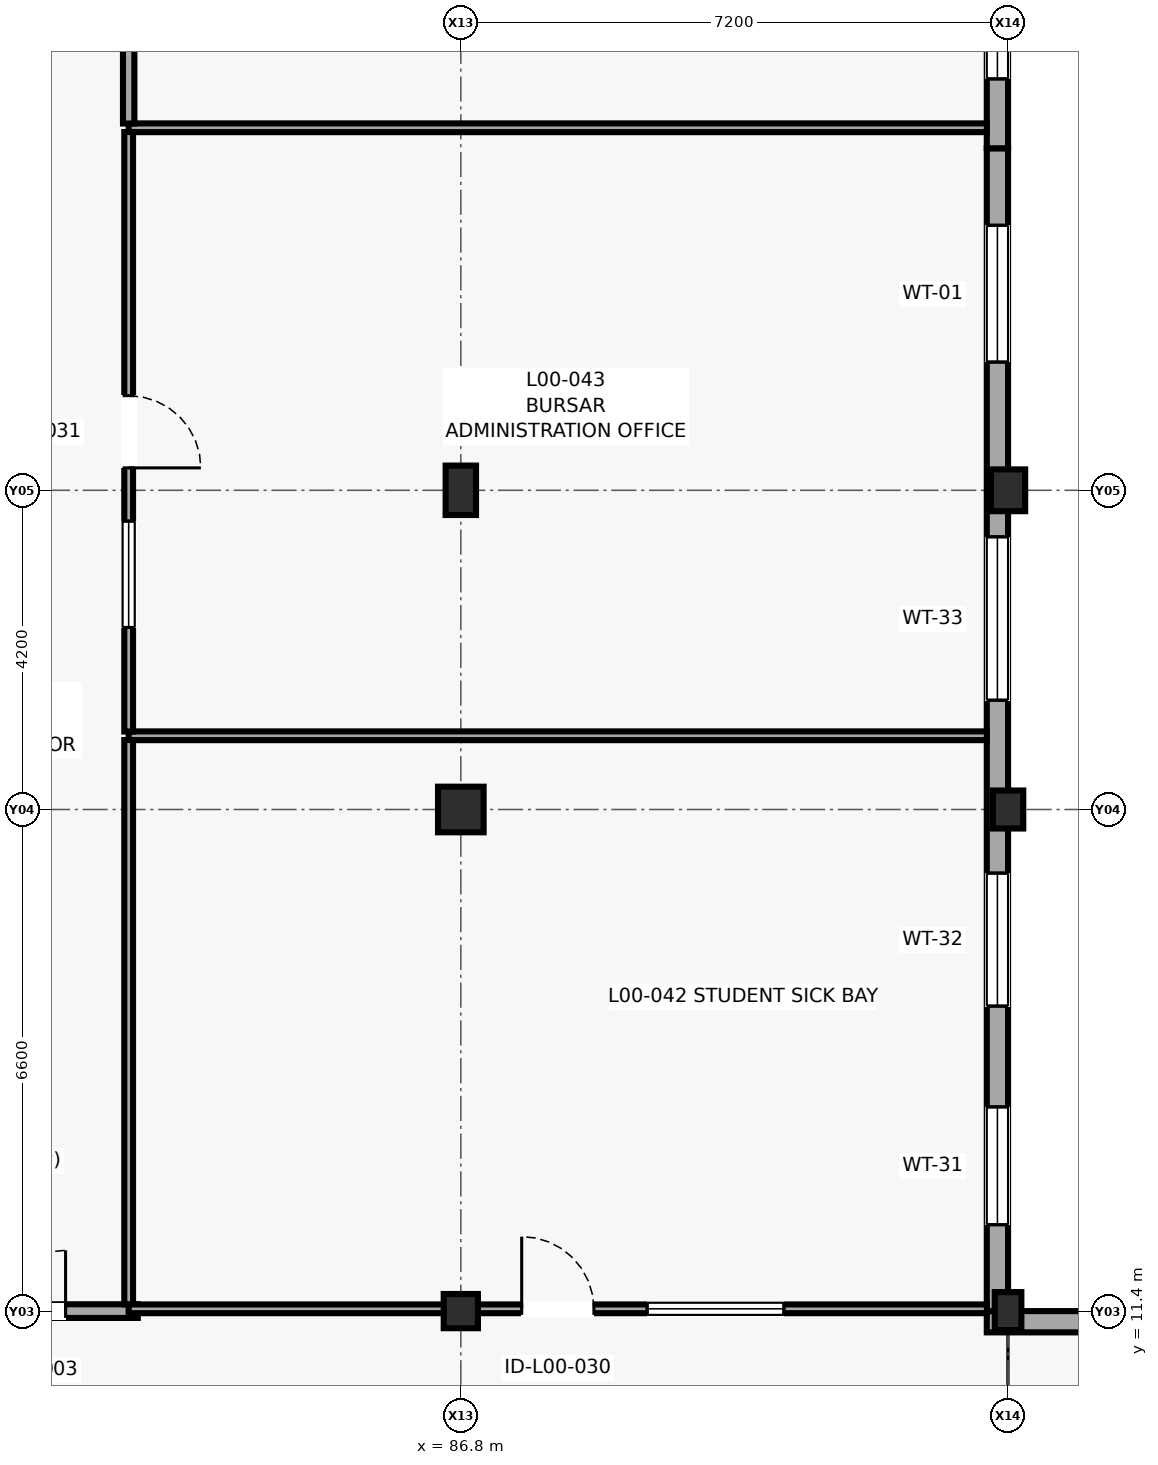
"""IFC4 building model, lengths in metres.
Left out: names, types, materials, properties, quantities, classifications, styles, units other than length and angle.
Written with IfcOpenShell. Run it as: python <this file> out.ifc"""

import sys

from ifc_helpers import new_model, si_unit, direction, frame, frame_2d, origin, origin_2d, place, context, subcontext, project, spatial, rectangle, extrude, element, fill, save


model = new_model("IFC4")
c1 = context("Model", 3, precision=1e-05, world=origin(), true_north=direction((0.0, 1.0)))
c2 = subcontext(c1, "Body", "Model", "MODEL_VIEW")
j1 = project(units=[si_unit("LENGTHUNIT", "METRE"), si_unit("PLANEANGLEUNIT", "RADIAN")], contexts=[c1])
p1 = place(None, origin())
s1 = spatial("IfcSite", under=j1, at=p1, CompositionType="ELEMENT")
p2 = place(p1, origin())
s2 = spatial("IfcBuilding", under=s1, at=p2, CompositionType="ELEMENT")
p3 = place(p2, origin())
s3 = spatial("IfcBuildingStorey", under=s2, at=p3, CompositionType="ELEMENT", Elevation=0.0)
p4 = place(p3, frame((86.8, 11.4, 0.0), z_axis=(0.0, 0.0, 1.0), x_axis=(1.0, 0.0, 0.0)))
e1 = element("IfcColumn", 1, at=p4, inside=s3, PredefinedType="COLUMN", context=c2, shape_type="SweptSolid", body=[
    extrude(rectangle(XDim=0.45, YDim=0.45, at=origin_2d()), origin(), (0.0, 0.0, 1.0), 4.2),
])
p5 = place(p3, frame((86.8, 18.0, 0.0), z_axis=(0.0, 0.0, 1.0), x_axis=(1.0, 0.0, 0.0)))
e2 = element("IfcColumn", 2, at=p5, inside=s3, PredefinedType="COLUMN", context=c2, shape_type="SweptSolid", body=[
    extrude(rectangle(XDim=0.6, YDim=0.6, at=origin_2d()), origin(), (0.0, 0.0, 1.0), 4.2),
])
p6 = place(p3, frame((86.8, 22.2, 0.0), z_axis=(0.0, 0.0, 1.0), x_axis=(1.0, 0.0, 0.0)))
e3 = element("IfcColumn", 3, at=p6, inside=s3, PredefinedType="COLUMN", context=c2, shape_type="SweptSolid", body=[
    extrude(rectangle(XDim=0.4, YDim=0.65, at=origin_2d()), origin(), (0.0, 0.0, 1.0), 4.2),
])
p7 = place(p3, frame((94.0, 11.4, 0.0), z_axis=(0.0, 0.0, 1.0), x_axis=(1.0, 0.0, 0.0)))
e4 = element("IfcColumn", 4, at=p7, inside=s3, PredefinedType="PILASTER", context=c2, shape_type="SweptSolid", body=[
    extrude(rectangle(XDim=0.35, YDim=0.5, at=origin_2d()), origin(), (0.0, 0.0, 1.0), 4.2),
])
p8 = place(p3, frame((94.0, 18.0, 0.0), z_axis=(0.0, 0.0, 1.0), x_axis=(1.0, 0.0, 0.0)))
e5 = element("IfcColumn", 5, at=p8, inside=s3, PredefinedType="PILASTER", context=c2, shape_type="SweptSolid", body=[
    extrude(rectangle(XDim=0.4, YDim=0.5, at=origin_2d()), origin(), (0.0, 0.0, 1.0), 4.2),
])
p9 = place(p3, frame((94.0, 22.2, 0.0), z_axis=(0.0, 0.0, 1.0), x_axis=(1.0, 0.0, 0.0)))
e6 = element("IfcColumn", 6, at=p9, inside=s3, PredefinedType="PILASTER", context=c2, shape_type="SweptSolid", body=[
    extrude(rectangle(XDim=0.45, YDim=0.55, at=origin_2d()), origin(), (0.0, 0.0, 1.0), 4.2),
])
p10 = place(p3, frame((106.444, 11.26, 0.0), z_axis=(0.0, 0.0, 1.0), x_axis=(-1.0, 0.0, 0.0)))
e7 = element("IfcWall", 7, at=p10, inside=s3, PredefinedType="SOLIDWALL", context=c2, shape_type="SweptSolid", body=[
    extrude(rectangle(XDim=12.724, YDim=0.28, at=frame_2d((6.362, 0.0))), origin(), (0.0, 0.0, 1.0), 3.205),
])
p11 = place(p10, frame((1.121, 0.0, 0.75)))
e8 = element("IfcOpeningElement", 8, at=p11, cuts=e7, PredefinedType="OPENING", context=c2, shape_type="SweptSolid", body=[
    extrude(rectangle(XDim=2.0, YDim=2.1, at=frame_2d((1.0, 1.05))), frame((0.0, 0.15, 0.0), z_axis=(0.0, -1.0, 0.0), x_axis=(1.0, 0.0, 0.0)), (0.0, 0.0, 1.0), 0.3),
])
p12 = place(p10, frame((5.987, 0.0, 0.85)))
e9 = element("IfcOpeningElement", 9, at=p12, cuts=e7, PredefinedType="OPENING", context=c2, shape_type="SweptSolid", body=[
    extrude(rectangle(XDim=1.65, YDim=1.95, at=frame_2d((0.825, 0.975))), frame((0.0, 0.15, 0.0), z_axis=(0.0, -1.0, 0.0), x_axis=(1.0, 0.0, 0.0)), (0.0, 0.0, 1.0), 0.3),
])
p13 = place(p10, frame((10.053, 0.0, 0.75)))
e10 = element("IfcOpeningElement", 10, at=p13, cuts=e7, PredefinedType="OPENING", context=c2, shape_type="SweptSolid", body=[
    extrude(rectangle(XDim=1.1, YDim=2.1, at=frame_2d((0.55, 1.05))), frame((0.0, 0.15, 0.0), z_axis=(0.0, -1.0, 0.0), x_axis=(1.0, 0.0, 0.0)), (0.0, 0.0, 1.0), 0.3),
])
p14 = place(p3, frame((93.86, 11.4, 0.0), z_axis=(0.0, 0.0, 1.0), x_axis=(0.0, 1.0, 0.0)))
e11 = element("IfcWall", 11, at=p14, inside=s3, PredefinedType="SOLIDWALL", context=c2, shape_type="SweptSolid", body=[
    extrude(rectangle(XDim=15.3, YDim=0.28, at=frame_2d((7.65, 0.0))), origin(), (0.0, 0.0, 1.0), 3.375),
])
p15 = place(p14, frame((1.137, 0.0, 0.85)))
e12 = element("IfcOpeningElement", 12, at=p15, cuts=e11, PredefinedType="OPENING", context=c2, shape_type="SweptSolid", body=[
    extrude(rectangle(XDim=1.55, YDim=1.85, at=frame_2d((0.775, 0.925))), frame((0.0, 0.15, 0.0), z_axis=(0.0, -1.0, 0.0), x_axis=(1.0, 0.0, 0.0)), (0.0, 0.0, 1.0), 0.3),
])
p16 = place(p14, frame((4.013, 0.0, 0.75)))
e13 = element("IfcOpeningElement", 13, at=p16, cuts=e11, PredefinedType="OPENING", context=c2, shape_type="SweptSolid", body=[
    extrude(rectangle(XDim=1.75, YDim=2.05, at=frame_2d((0.875, 1.025))), frame((0.0, 0.15, 0.0), z_axis=(0.0, -1.0, 0.0), x_axis=(1.0, 0.0, 0.0)), (0.0, 0.0, 1.0), 0.3),
])
p17 = place(p14, frame((8.038, 0.0, 0.85)))
e14 = element("IfcOpeningElement", 14, at=p17, cuts=e11, PredefinedType="OPENING", context=c2, shape_type="SweptSolid", body=[
    extrude(rectangle(XDim=2.15, YDim=1.95, at=frame_2d((1.075, 0.975))), frame((0.0, 0.15, 0.0), z_axis=(0.0, -1.0, 0.0), x_axis=(1.0, 0.0, 0.0)), (0.0, 0.0, 1.0), 0.3),
])
p18 = place(p14, frame((12.487, 0.0, 0.85)))
e15 = element("IfcOpeningElement", 15, at=p18, cuts=e11, PredefinedType="OPENING", context=c2, shape_type="SweptSolid", body=[
    extrude(rectangle(XDim=1.8, YDim=1.8, at=frame_2d((0.9, 0.9))), frame((0.0, 0.15, 0.0), z_axis=(0.0, -1.0, 0.0), x_axis=(1.0, 0.0, 0.0)), (0.0, 0.0, 1.0), 0.3),
])
p19 = place(p3, frame((93.86, 26.7, 0.0), z_axis=(0.0, 0.0, 1.0), x_axis=(0.0, 1.0, 0.0)))
e16 = element("IfcWall", 16, at=p19, inside=s3, PredefinedType="SOLIDWALL", context=c2, shape_type="SweptSolid", body=[
    extrude(rectangle(XDim=15.3, YDim=0.28, at=frame_2d((7.65, 0.0))), origin(), (0.0, 0.0, 1.0), 3.375),
])
p20 = place(p19, frame((0.913, 0.0, 0.75)))
e17 = element("IfcOpeningElement", 17, at=p20, cuts=e16, PredefinedType="OPENING", context=c2, shape_type="SweptSolid", body=[
    extrude(rectangle(XDim=1.1, YDim=2.1, at=frame_2d((0.55, 1.05))), frame((0.0, 0.15, 0.0), z_axis=(0.0, -1.0, 0.0), x_axis=(1.0, 0.0, 0.0)), (0.0, 0.0, 1.0), 0.3),
])
p21 = place(p19, frame((4.338, 0.0, 0.75)))
e18 = element("IfcOpeningElement", 18, at=p21, cuts=e16, PredefinedType="OPENING", context=c2, shape_type="SweptSolid", body=[
    extrude(rectangle(XDim=1.1, YDim=2.1, at=frame_2d((0.55, 1.05))), frame((0.0, 0.15, 0.0), z_axis=(0.0, -1.0, 0.0), x_axis=(1.0, 0.0, 0.0)), (0.0, 0.0, 1.0), 0.3),
])
p22 = place(p19, frame((8.263, 0.0, 1.05)))
e19 = element("IfcOpeningElement", 19, at=p22, cuts=e16, PredefinedType="OPENING", context=c2, shape_type="SweptSolid", body=[
    extrude(rectangle(XDim=0.9, YDim=1.5, at=frame_2d((0.45, 0.75))), frame((0.0, 0.15, 0.0), z_axis=(0.0, -1.0, 0.0), x_axis=(1.0, 0.0, 0.0)), (0.0, 0.0, 1.0), 0.3),
])
p23 = place(p19, frame((12.788, 0.0, 0.85)))
e20 = element("IfcOpeningElement", 20, at=p23, cuts=e16, PredefinedType="OPENING", context=c2, shape_type="SweptSolid", body=[
    extrude(rectangle(XDim=1.2, YDim=1.65, at=frame_2d((0.6, 0.825))), frame((0.0, 0.15, 0.0), z_axis=(0.0, -1.0, 0.0), x_axis=(1.0, 0.0, 0.0)), (0.0, 0.0, 1.0), 0.3),
])
p24 = place(p3, frame((79.05, 11.4, 0.0), z_axis=(0.0, 0.0, 1.0), x_axis=(1.0, 0.0, 0.0)))
e21 = element("IfcWall", 21, at=p24, inside=s3, PredefinedType="PARTITIONING", context=c2, shape_type="SweptSolid", body=[
    extrude(rectangle(XDim=3.5, YDim=0.18, at=frame_2d((1.75, 0.0))), origin(), (0.0, 0.0, 1.0), 3.255),
])
p25 = place(p24, frame((0.95, 0.0, 0.0)))
e22 = element("IfcOpeningElement", 22, at=p25, cuts=e21, PredefinedType="OPENING", context=c2, shape_type="SweptSolid", body=[
    extrude(rectangle(XDim=1.6, YDim=2.25, at=frame_2d((0.8, 1.125))), frame((0.0, 0.1, 0.0), z_axis=(0.0, -1.0, 0.0), x_axis=(1.0, 0.0, 0.0)), (0.0, 0.0, 1.0), 0.2),
])
p26 = place(p3, frame((93.722, 18.97, 0.0), z_axis=(0.0, 0.0, 1.0), x_axis=(-1.0, 0.0, 0.0)))
e23 = element("IfcWall", 23, at=p26, inside=s3, PredefinedType="PARTITIONING", context=c2, shape_type="SweptSolid", body=[
    extrude(rectangle(XDim=11.292, YDim=0.115, at=frame_2d((5.646, 0.0))), origin(), (0.0, 0.0, 1.0), 3.955),
])
p27 = place(p3, frame((82.43, 18.914, 0.0), z_axis=(0.0, 0.0, 1.0), x_axis=(0.0, -1.0, 0.0)))
e24 = element("IfcWall", 24, at=p27, inside=s3, PredefinedType="PARTITIONING", context=c2, shape_type="SweptSolid", body=[
    extrude(rectangle(XDim=7.426, YDim=0.115, at=frame_2d((3.713, 0.0))), origin(), (0.0, 0.0, 1.0), 3.955),
])
p28 = place(p3, frame((82.43, 11.43, 0.0), z_axis=(0.0, 0.0, 1.0), x_axis=(1.0, 0.0, 0.0)))
e25 = element("IfcWall", 25, at=p28, inside=s3, PredefinedType="PARTITIONING", context=c2, shape_type="SweptSolid", body=[
    extrude(rectangle(XDim=11.292, YDim=0.115, at=frame_2d((5.646, 0.0))), origin(), (0.0, 0.0, 1.0), 3.255),
])
p29 = place(p28, frame((5.171, 0.0, 0.0)))
e26 = element("IfcOpeningElement", 26, at=p29, cuts=e25, PredefinedType="OPENING", context=c2, shape_type="SweptSolid", body=[
    extrude(rectangle(XDim=0.95, YDim=2.05, at=frame_2d((0.475, 1.025))), frame((0.0, 0.067, 0.0), z_axis=(0.0, -1.0, 0.0), x_axis=(1.0, 0.0, 0.0)), (0.0, 0.0, 1.0), 0.135),
])
p30 = place(p28, frame((6.821, 0.0, 1.05)))
e27 = element("IfcOpeningElement", 27, at=p30, cuts=e25, PredefinedType="OPENING", context=c2, shape_type="SweptSolid", body=[
    extrude(rectangle(XDim=1.8, YDim=1.2, at=frame_2d((0.9, 0.6))), frame((0.0, 0.067, 0.0), z_axis=(0.0, -1.0, 0.0), x_axis=(1.0, 0.0, 0.0)), (0.0, 0.0, 1.0), 0.135),
])
p31 = place(p3, frame((93.722, 26.97, 0.0), z_axis=(0.0, 0.0, 1.0), x_axis=(-1.0, 0.0, 0.0)))
e28 = element("IfcWall", 28, at=p31, inside=s3, PredefinedType="PARTITIONING", context=c2, shape_type="SweptSolid", body=[
    extrude(rectangle(XDim=11.292, YDim=0.115, at=frame_2d((5.646, 0.0))), origin(), (0.0, 0.0, 1.0), 3.975),
])
p32 = place(p3, frame((82.43, 26.914, 0.0), z_axis=(0.0, 0.0, 1.0), x_axis=(0.0, -1.0, 0.0)))
e29 = element("IfcWall", 29, at=p32, inside=s3, PredefinedType="PARTITIONING", context=c2, shape_type="SweptSolid", body=[
    extrude(rectangle(XDim=7.888, YDim=0.115, at=frame_2d((3.944, 0.0))), origin(), (0.0, 0.0, 1.0), 3.975),
])
p33 = place(p32, frame((3.469, 0.0, 0.0)))
e30 = element("IfcOpeningElement", 30, at=p33, cuts=e29, PredefinedType="OPENING", context=c2, shape_type="SweptSolid", body=[
    extrude(rectangle(XDim=0.95, YDim=2.05, at=frame_2d((0.475, 1.025))), frame((0.0, 0.067, 0.0), z_axis=(0.0, -1.0, 0.0), x_axis=(1.0, 0.0, 0.0)), (0.0, 0.0, 1.0), 0.135),
])
p34 = place(p32, frame((5.119, 0.0, 1.05)))
e31 = element("IfcOpeningElement", 31, at=p34, cuts=e29, PredefinedType="OPENING", context=c2, shape_type="SweptSolid", body=[
    extrude(rectangle(XDim=1.4, YDim=1.05, at=frame_2d((0.7, 0.525))), frame((0.0, 0.067, 0.0), z_axis=(0.0, -1.0, 0.0), x_axis=(1.0, 0.0, 0.0)), (0.0, 0.0, 1.0), 0.135),
])
p35 = place(p3, frame((82.43, 33.437, 0.0), z_axis=(0.0, 0.0, 1.0), x_axis=(0.0, -1.0, 0.0)))
e32 = element("IfcWall", 32, at=p35, inside=s3, PredefinedType="PARTITIONING", context=c2, shape_type="SweptSolid", body=[
    extrude(rectangle(XDim=6.411, YDim=0.15, at=frame_2d((3.206, 0.0))), origin(), (0.0, 0.0, 1.0), 3.975),
])
p36 = place(p35, frame((2.555, 0.0, 0.0)))
e33 = element("IfcOpeningElement", 33, at=p36, cuts=e32, PredefinedType="OPENING", context=c2, shape_type="SweptSolid", body=[
    extrude(rectangle(XDim=1.3, YDim=2.15, at=frame_2d((0.65, 1.075))), frame((0.0, 0.085, 0.0), z_axis=(0.0, -1.0, 0.0), x_axis=(1.0, 0.0, 0.0)), (0.0, 0.0, 1.0), 0.17),
])
p37 = place(p15, origin())
e34 = element("IfcWindow", 34, at=p37, inside=s3, PartitioningType="SINGLE_PANEL", PredefinedType="WINDOW", context=c2, shape_type="SweptSolid", body=[
    extrude(rectangle(XDim=1.55, YDim=1.85, at=frame_2d((0.775, 0.925))), frame((0.0, 0.03, 0.0), z_axis=(0.0, -1.0, 0.0), x_axis=(1.0, 0.0, 0.0)), (0.0, 0.0, 1.0), 0.06),
])
fill(e12, e34)
p38 = place(p16, origin())
e35 = element("IfcWindow", 35, at=p38, inside=s3, PartitioningType="SINGLE_PANEL", PredefinedType="WINDOW", context=c2, shape_type="SweptSolid", body=[
    extrude(rectangle(XDim=1.75, YDim=2.05, at=frame_2d((0.875, 1.025))), frame((0.0, 0.03, 0.0), z_axis=(0.0, -1.0, 0.0), x_axis=(1.0, 0.0, 0.0)), (0.0, 0.0, 1.0), 0.06),
])
fill(e13, e35)
p39 = place(p17, origin())
e36 = element("IfcWindow", 36, at=p39, inside=s3, PartitioningType="SINGLE_PANEL", PredefinedType="WINDOW", context=c2, shape_type="SweptSolid", body=[
    extrude(rectangle(XDim=2.15, YDim=1.95, at=frame_2d((1.075, 0.975))), frame((0.0, 0.03, 0.0), z_axis=(0.0, -1.0, 0.0), x_axis=(1.0, 0.0, 0.0)), (0.0, 0.0, 1.0), 0.06),
])
fill(e14, e36)
p40 = place(p18, origin())
e37 = element("IfcWindow", 37, at=p40, inside=s3, PartitioningType="SINGLE_PANEL", PredefinedType="WINDOW", context=c2, shape_type="SweptSolid", body=[
    extrude(rectangle(XDim=1.8, YDim=1.8, at=frame_2d((0.9, 0.9))), frame((0.0, 0.03, 0.0), z_axis=(0.0, -1.0, 0.0), x_axis=(1.0, 0.0, 0.0)), (0.0, 0.0, 1.0), 0.06),
])
fill(e15, e37)
p41 = place(p20, origin())
e38 = element("IfcWindow", 38, at=p41, inside=s3, PartitioningType="SINGLE_PANEL", PredefinedType="WINDOW", context=c2, shape_type="SweptSolid", body=[
    extrude(rectangle(XDim=1.1, YDim=2.1, at=frame_2d((0.55, 1.05))), frame((0.0, 0.03, 0.0), z_axis=(0.0, -1.0, 0.0), x_axis=(1.0, 0.0, 0.0)), (0.0, 0.0, 1.0), 0.06),
])
fill(e17, e38)
p42 = place(p25, origin())
e39 = element("IfcDoor", 39, at=p42, inside=s3, OperationType="DOUBLE_DOOR_SINGLE_SWING", PredefinedType="DOOR", context=c2, shape_type="SweptSolid", body=[
    extrude(rectangle(XDim=1.6, YDim=2.25, at=frame_2d((0.8, 1.125))), frame((0.0, 0.025, 0.0), z_axis=(0.0, -1.0, 0.0), x_axis=(1.0, 0.0, 0.0)), (0.0, 0.0, 1.0), 0.05),
])
fill(e22, e39)
p43 = place(p29, origin())
e40 = element("IfcDoor", 40, at=p43, inside=s3, OperationType="SINGLE_SWING_LEFT", PredefinedType="DOOR", context=c2, shape_type="SweptSolid", body=[
    extrude(rectangle(XDim=0.95, YDim=2.05, at=frame_2d((0.475, 1.025))), frame((0.0, 0.025, 0.0), z_axis=(0.0, -1.0, 0.0), x_axis=(1.0, 0.0, 0.0)), (0.0, 0.0, 1.0), 0.05),
])
fill(e26, e40)
p44 = place(p30, origin())
e41 = element("IfcWindow", 41, at=p44, inside=s3, PartitioningType="SINGLE_PANEL", PredefinedType="WINDOW", context=c2, shape_type="SweptSolid", body=[
    extrude(rectangle(XDim=1.8, YDim=1.2, at=frame_2d((0.9, 0.6))), frame((0.0, 0.03, 0.0), z_axis=(0.0, -1.0, 0.0), x_axis=(1.0, 0.0, 0.0)), (0.0, 0.0, 1.0), 0.06),
])
fill(e27, e41)
p45 = place(p33, origin())
e42 = element("IfcDoor", 42, at=p45, inside=s3, OperationType="SINGLE_SWING_RIGHT", PredefinedType="DOOR", context=c2, shape_type="SweptSolid", body=[
    extrude(rectangle(XDim=0.95, YDim=2.05, at=frame_2d((0.475, 1.025))), frame((0.0, 0.025, 0.0), z_axis=(0.0, -1.0, 0.0), x_axis=(1.0, 0.0, 0.0)), (0.0, 0.0, 1.0), 0.05),
])
fill(e30, e42)
p46 = place(p34, origin())
e43 = element("IfcWindow", 43, at=p46, inside=s3, PartitioningType="SINGLE_PANEL", PredefinedType="WINDOW", context=c2, shape_type="SweptSolid", body=[
    extrude(rectangle(XDim=1.4, YDim=1.05, at=frame_2d((0.7, 0.525))), frame((0.0, 0.03, 0.0), z_axis=(0.0, -1.0, 0.0), x_axis=(1.0, 0.0, 0.0)), (0.0, 0.0, 1.0), 0.06),
])
fill(e31, e43)
save(model, sys.argv[1])
